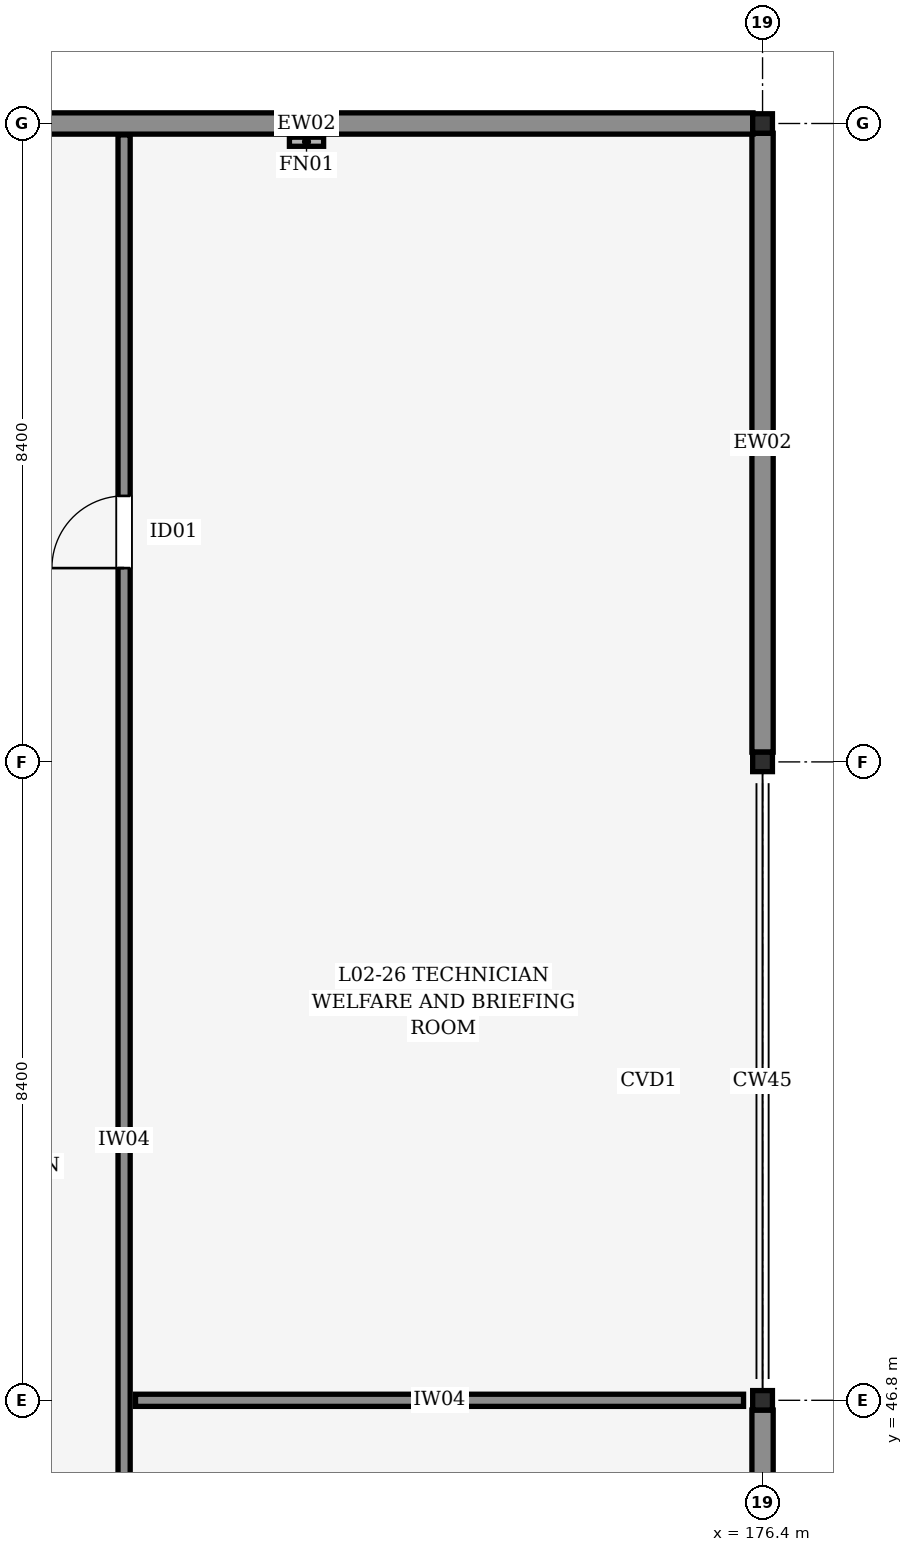
"""IFC4 building model, lengths in metres.
Left out: names, types, materials, properties, quantities, classifications, styles, units other than length and angle.
Written with IfcOpenShell. Run it as: python <this file> out.ifc"""

import sys

from ifc_helpers import new_model, si_unit, direction, frame, frame_2d, origin, origin_2d, place, context, subcontext, project, spatial, rectangle, i_section, extrude, element, fill, save


model = new_model("IFC4")
c1 = context("Model", 3, precision=1e-05, world=origin(), true_north=direction((0.0, 1.0)))
c2 = subcontext(c1, "Body", "Model", "MODEL_VIEW")
j1 = project(units=[si_unit("LENGTHUNIT", "METRE"), si_unit("PLANEANGLEUNIT", "RADIAN")], contexts=[c1])
p1 = place(None, origin())
s1 = spatial("IfcSite", under=j1, at=p1, CompositionType="ELEMENT")
p2 = place(p1, origin())
s2 = spatial("IfcBuilding", under=s1, at=p2, CompositionType="ELEMENT")
p3 = place(p2, frame((0.0, 0.0, 9.0)))
s3 = spatial("IfcBuildingStorey", under=s2, at=p3, CompositionType="ELEMENT", Elevation=9.0)
for number, where, z_axis, x_axis in (
    (1, (176.4, 46.8, 0.0), (0.0, 0.0, 1.0), (1.0, 0.0, 0.0)),
    (2, (176.4, 55.2, 0.0), (0.0, 0.0, 1.0), (1.0, 0.0, 0.0)),
    (3, (176.4, 63.6, 0.0), (0.0, 0.0, 1.0), (1.0, 0.0, 0.0)),
):
    element("IfcColumn", number, at=place(p3, frame(where, z_axis=z_axis, x_axis=x_axis)), inside=s3, PredefinedType="COLUMN", context=c2, shape_type="SweptSolid", body=[
        extrude(i_section(OverallWidth=0.256, OverallDepth=0.26, WebThickness=0.01, FlangeThickness=0.017, FilletRadius=0.013, at=origin_2d()), origin(), (0.0, 0.0, 1.0), 3.6),
    ])
p4 = place(p3, frame((176.4, 38.528, 0.0), z_axis=(0.0, 0.0, 1.0), x_axis=(0.0, 1.0, 0.0)))
e4 = element("IfcWall", 4, at=p4, inside=s3, PredefinedType="STANDARD", context=c2, shape_type="SweptSolid", body=[
    extrude(rectangle(XDim=8.144, YDim=0.28, at=frame_2d((4.072, 0.0))), origin(), (0.0, 0.0, 1.0), 2.535),
])
p5 = place(p4, frame((1.12, 0.0, 0.295)))
e5 = element("IfcOpeningElement", 5, at=p5, cuts=e4, PredefinedType="OPENING", context=c2, shape_type="SweptSolid", body=[
    extrude(rectangle(XDim=1.65, YDim=2.1, at=frame_2d((0.825, 1.05))), frame((0.0, 0.15, 0.0), z_axis=(0.0, -1.0, 0.0), x_axis=(1.0, 0.0, 0.0)), (0.0, 0.0, 1.0), 0.3),
])
p6 = place(p3, frame((176.4, 55.328, 0.0), z_axis=(0.0, 0.0, 1.0), x_axis=(0.0, 1.0, 0.0)))
e6 = element("IfcWall", 6, at=p6, inside=s3, PredefinedType="STANDARD", context=c2, shape_type="SweptSolid", body=[
    extrude(rectangle(XDim=8.144, YDim=0.28, at=frame_2d((4.072, 0.0))), origin(), (0.0, 0.0, 1.0), 1.74),
])
p7 = place(p3, frame((164.526, 63.6, 0.0), z_axis=(0.0, 0.0, 1.0), x_axis=(1.0, 0.0, 0.0)))
e7 = element("IfcWall", 7, at=p7, inside=s3, PredefinedType="STANDARD", context=c2, shape_type="SweptSolid", body=[
    extrude(rectangle(XDim=11.748, YDim=0.28, at=frame_2d((5.874, 0.0))), origin(), (0.0, 0.0, 1.0), 1.74),
])
p8 = place(p3, frame((168.0, 21.75, 0.0), z_axis=(0.0, 0.0, 1.0), x_axis=(0.0, 1.0, 0.0)))
e8 = element("IfcWall", 8, at=p8, inside=s3, PredefinedType="PARTITIONING", context=c2, shape_type="SweptSolid", body=[
    extrude(rectangle(XDim=41.7, YDim=0.16, at=frame_2d((20.85, 0.0))), origin(), (0.0, 0.0, 1.0), 2.525),
])
p9 = place(p8, frame((8.0, 0.0, 0.0)))
e9 = element("IfcOpeningElement", 9, at=p9, cuts=e8, PredefinedType="OPENING", context=c2, shape_type="SweptSolid", body=[
    extrude(rectangle(XDim=0.95, YDim=2.1, at=frame_2d((0.475, 1.05))), frame((0.0, 0.09, 0.0), z_axis=(0.0, -1.0, 0.0), x_axis=(1.0, 0.0, 0.0)), (0.0, 0.0, 1.0), 0.18),
])
p10 = place(p8, frame((20.0, 0.0, 0.0)))
e10 = element("IfcOpeningElement", 10, at=p10, cuts=e8, PredefinedType="OPENING", context=c2, shape_type="SweptSolid", body=[
    extrude(rectangle(XDim=0.95, YDim=2.1, at=frame_2d((0.475, 1.05))), frame((0.0, 0.09, 0.0), z_axis=(0.0, -1.0, 0.0), x_axis=(1.0, 0.0, 0.0)), (0.0, 0.0, 1.0), 0.18),
])
p11 = place(p8, frame((36.0, 0.0, 0.0)))
e11 = element("IfcOpeningElement", 11, at=p11, cuts=e8, PredefinedType="OPENING", context=c2, shape_type="SweptSolid", body=[
    extrude(rectangle(XDim=0.95, YDim=2.1, at=frame_2d((0.475, 1.05))), frame((0.0, 0.09, 0.0), z_axis=(0.0, -1.0, 0.0), x_axis=(1.0, 0.0, 0.0)), (0.0, 0.0, 1.0), 0.18),
])
p12 = place(p3, frame((168.15, 46.8, 0.0), z_axis=(0.0, 0.0, 1.0), x_axis=(1.0, 0.0, 0.0)))
e12 = element("IfcWall", 12, at=p12, inside=s3, PredefinedType="PARTITIONING", context=c2, shape_type="SweptSolid", body=[
    extrude(rectangle(XDim=8.0, YDim=0.16, at=frame_2d((4.0, 0.0))), origin(), (0.0, 0.0, 1.0), 2.525),
])
p13 = place(p11, origin())
e13 = element("IfcDoor", 13, at=p13, inside=s3, OperationType="SINGLE_SWING_LEFT", PredefinedType="DOOR", context=c2, shape_type="SweptSolid", body=[
    extrude(rectangle(XDim=0.95, YDim=2.1, at=frame_2d((0.475, 1.05))), frame((0.0, 0.025, 0.0), z_axis=(0.0, -1.0, 0.0), x_axis=(1.0, 0.0, 0.0)), (0.0, 0.0, 1.0), 0.05),
])
fill(e11, e13)
save(model, sys.argv[1])
